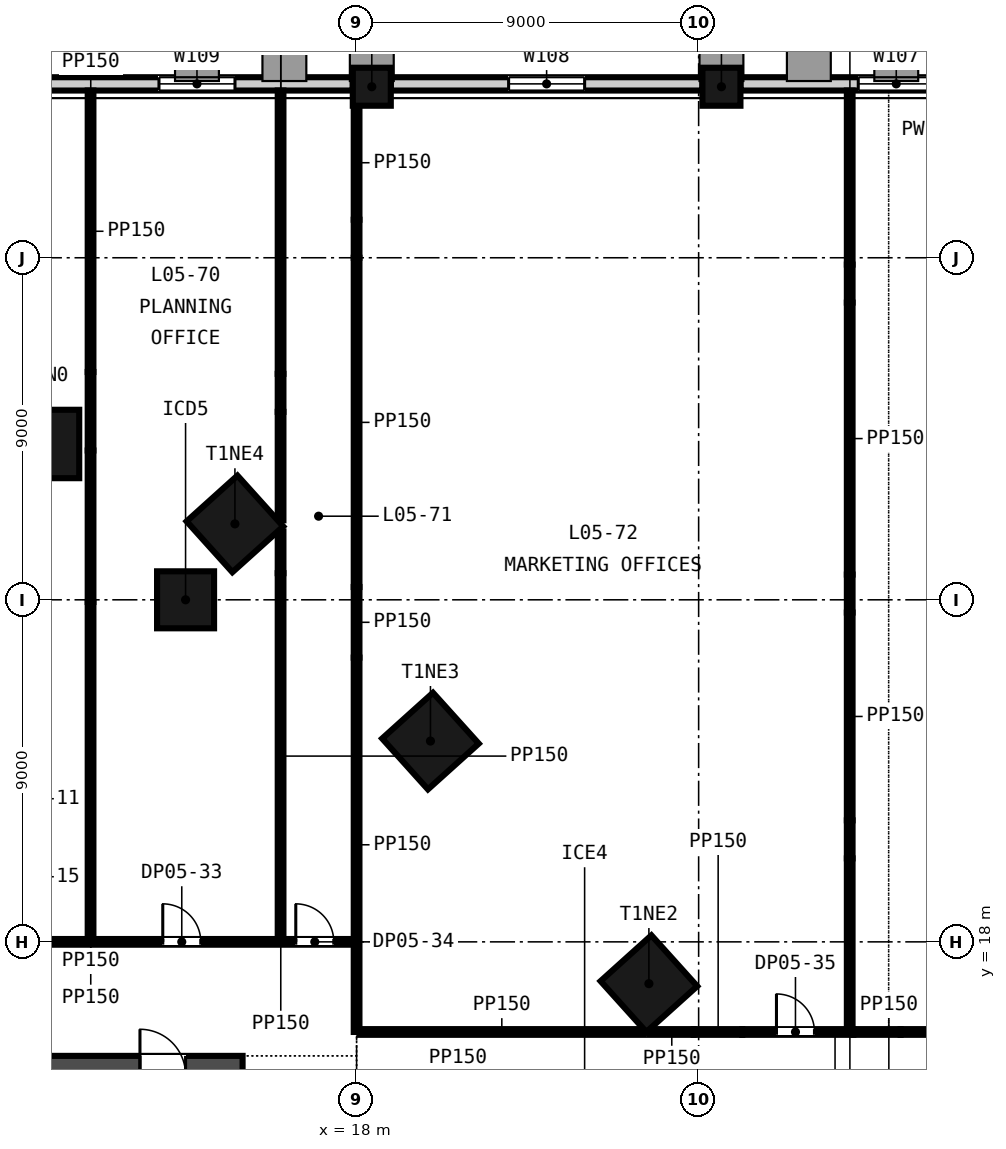
"""IFC4 building model, lengths in metres.
Left out: names, types, materials, properties, quantities, classifications, styles, units other than length and angle.
Written with IfcOpenShell. Run it as: python <this file> out.ifc"""

import sys

from ifc_helpers import new_model, si_unit, direction, frame, frame_2d, origin, origin_2d, place, context, subcontext, project, spatial, rectangle, extrude, element, fill, save


model = new_model("IFC4")
c1 = context("Model", 3, precision=1e-05, world=origin(), true_north=direction((0.0, 1.0)))
c2 = subcontext(c1, "Body", "Model", "MODEL_VIEW")
j1 = project(units=[si_unit("LENGTHUNIT", "METRE"), si_unit("PLANEANGLEUNIT", "RADIAN")], contexts=[c1])
p1 = place(None, origin())
s1 = spatial("IfcSite", under=j1, at=p1, CompositionType="ELEMENT")
p2 = place(p1, origin())
s2 = spatial("IfcBuilding", under=s1, at=p2, CompositionType="ELEMENT")
p3 = place(p2, frame((0.0, 0.0, 31.5)))
s3 = spatial("IfcBuildingStorey", under=s2, at=p3, CompositionType="ELEMENT", Elevation=31.5)
p4 = place(p3, frame((-15.0, 14.5, -0.3), z_axis=(0.0, 0.0, 1.0), x_axis=(1.0, 0.0, 0.0)))
e1 = element("IfcWall", 1, at=p4, inside=s3, PredefinedType="SOLIDWALL", context=c2, shape_type="SweptSolid", body=[
    extrude(rectangle(XDim=30.0, YDim=1.0, at=frame_2d((15.0, 0.0))), origin(), (0.0, 0.0, 1.0), 4.65),
])
p5 = place(p4, frame((9.25, 0.0, 0.3)))
e2 = element("IfcOpeningElement", 2, at=p5, cuts=e1, PredefinedType="OPENING", context=c2, shape_type="SweptSolid", body=[
    extrude(rectangle(XDim=1.5, YDim=2.1, at=frame_2d((0.75, 1.05))), frame((0.0, 0.51, 0.0), z_axis=(0.0, -1.0, 0.0), x_axis=(1.0, 0.0, 0.0)), (0.0, 0.0, 1.0), 1.02),
])
p6 = place(p4, frame((19.4, 0.0, 0.3)))
e3 = element("IfcOpeningElement", 3, at=p6, cuts=e1, PredefinedType="OPENING", context=c2, shape_type="SweptSolid", body=[
    extrude(rectangle(XDim=1.5, YDim=2.1, at=frame_2d((0.75, 1.05))), frame((0.0, 0.51, 0.0), z_axis=(0.0, -1.0, 0.0), x_axis=(1.0, 0.0, 0.0)), (0.0, 0.0, 1.0), 1.02),
])
p7 = place(p4, frame((1.5, 0.0, 0.3)))
e4 = element("IfcOpeningElement", 4, at=p7, cuts=e1, PredefinedType="OPENING", context=c2, shape_type="SweptSolid", body=[
    extrude(rectangle(XDim=1.2, YDim=2.1, at=frame_2d((0.6, 1.05))), frame((0.0, 0.51, 0.0), z_axis=(0.0, -1.0, 0.0), x_axis=(1.0, 0.0, 0.0)), (0.0, 0.0, 1.0), 1.02),
])
p8 = place(p4, frame((27.3, 0.0, 0.3)))
e5 = element("IfcOpeningElement", 5, at=p8, cuts=e1, PredefinedType="OPENING", context=c2, shape_type="SweptSolid", body=[
    extrude(rectangle(XDim=1.2, YDim=2.1, at=frame_2d((0.6, 1.05))), frame((0.0, 0.51, 0.0), z_axis=(0.0, -1.0, 0.0), x_axis=(1.0, 0.0, 0.0)), (0.0, 0.0, 1.0), 1.02),
])
for number, where, z_axis, x_axis in (
    (6, (9.802, 31.1, -0.3), (0.0, 0.0, 1.0), (-1.0, 0.0, 0.0)),
    (7, (25.691, 16.9, -0.3), (0.0, 0.0, 1.0), (-0.669, 0.743, 0.0)),
    (8, (19.944, 23.283, -0.3), (0.0, 0.0, 1.0), (-0.669, 0.743, 0.0)),
    (9, (14.799, 28.998, -0.3), (0.0, 0.0, 1.0), (-0.669, 0.743, 0.0)),
):
    element("IfcColumn", number, at=place(p3, frame(where, z_axis=z_axis, x_axis=x_axis)), inside=s3, PredefinedType="COLUMN", context=c2, shape_type="SweptSolid", body=[
        extrude(rectangle(XDim=1.8, YDim=1.8, at=origin_2d()), origin(), (0.0, 0.0, 1.0), 4.65),
    ])
p9 = place(p3, frame((13.5, 27.0, -0.3), z_axis=(0.0, 0.0, 1.0), x_axis=(1.0, 0.0, 0.0)))
e10 = element("IfcColumn", 10, at=p9, inside=s3, PredefinedType="COLUMN", context=c2, shape_type="SweptSolid", body=[
    extrude(rectangle(XDim=1.5, YDim=1.5, at=origin_2d()), origin(), (0.0, 0.0, 1.0), 4.65),
])
for number, where, z_axis, x_axis in (
    (11, (27.6, 40.5, -0.3), (0.0, 0.0, 1.0), (-1.0, 0.0, 0.0)),
    (12, (18.4, 40.5, -0.3), (0.0, 0.0, 1.0), (-1.0, 0.0, 0.0)),
):
    element("IfcColumn", number, at=place(p3, frame(where, z_axis=z_axis, x_axis=x_axis)), inside=s3, PredefinedType="COLUMN", context=c2, shape_type="SweptSolid", body=[
        extrude(rectangle(XDim=1.0, YDim=1.0, at=origin_2d()), origin(), (0.0, 0.0, 1.0), 4.65),
    ])
p10 = place(p3, frame((36.3, 40.575, -0.3), z_axis=(0.0, 0.0, 1.0), x_axis=(-1.0, 0.0, 0.0)))
e13 = element("IfcWall", 13, at=p10, inside=s3, PredefinedType="SOLIDWALL", context=c2, shape_type="SweptSolid", body=[
    extrude(rectangle(XDim=8.2, YDim=0.35, at=frame_2d((4.1, 0.0))), origin(), (0.0, 0.0, 1.0), 3.75),
])
p11 = place(p10, frame((3.1, 0.0, 1.2)))
e14 = element("IfcOpeningElement", 14, at=p11, cuts=e13, PredefinedType="OPENING", context=c2, shape_type="SweptSolid", body=[
    extrude(rectangle(XDim=2.0, YDim=2.5, at=frame_2d((1.0, 1.25))), frame((0.0, 0.185, 0.0), z_axis=(0.0, -1.0, 0.0), x_axis=(1.0, 0.0, 0.0)), (0.0, 0.0, 1.0), 0.37),
])
p12 = place(p3, frame((27.1, 40.575, -0.3), z_axis=(0.0, 0.0, 1.0), x_axis=(-1.0, 0.0, 0.0)))
e15 = element("IfcWall", 15, at=p12, inside=s3, PredefinedType="SOLIDWALL", context=c2, shape_type="SweptSolid", body=[
    extrude(rectangle(XDim=8.2, YDim=0.35, at=frame_2d((4.1, 0.0))), origin(), (0.0, 0.0, 1.0), 3.75),
])
p13 = place(p12, frame((3.1, 0.0, 1.2)))
e16 = element("IfcOpeningElement", 16, at=p13, cuts=e15, PredefinedType="OPENING", context=c2, shape_type="SweptSolid", body=[
    extrude(rectangle(XDim=2.0, YDim=2.5, at=frame_2d((1.0, 1.25))), frame((0.0, 0.185, 0.0), z_axis=(0.0, -1.0, 0.0), x_axis=(1.0, 0.0, 0.0)), (0.0, 0.0, 1.0), 0.37),
])
p14 = place(p3, frame((17.9, 40.575, -0.3), z_axis=(0.0, 0.0, 1.0), x_axis=(-1.0, 0.0, 0.0)))
e17 = element("IfcWall", 17, at=p14, inside=s3, PredefinedType="SOLIDWALL", context=c2, shape_type="SweptSolid", body=[
    extrude(rectangle(XDim=8.2, YDim=0.35, at=frame_2d((4.1, 0.0))), origin(), (0.0, 0.0, 1.0), 3.75),
])
p15 = place(p14, frame((3.1, 0.0, 1.2)))
e18 = element("IfcOpeningElement", 18, at=p15, cuts=e17, PredefinedType="OPENING", context=c2, shape_type="SweptSolid", body=[
    extrude(rectangle(XDim=2.0, YDim=2.5, at=frame_2d((1.0, 1.25))), frame((0.0, 0.185, 0.0), z_axis=(0.0, -1.0, 0.0), x_axis=(1.0, 0.0, 0.0)), (0.0, 0.0, 1.0), 0.37),
])
p16 = place(p3, frame((18.075, 15.629, 0.0), z_axis=(0.0, 0.0, 1.0), x_axis=(1.0, 0.0, 0.0)))
e19 = element("IfcWall", 19, at=p16, inside=s3, PredefinedType="PARTITIONING", context=c2, shape_type="SweptSolid", body=[
    extrude(rectangle(XDim=7.482, YDim=0.15, at=frame_2d((3.741, 0.0))), origin(), (0.0, 0.0, 1.0), 4.35),
])
p17 = place(p3, frame((25.708, 15.629, 0.0), z_axis=(0.0, 0.0, 1.0), x_axis=(1.0, 0.0, 0.0)))
e20 = element("IfcWall", 20, at=p17, inside=s3, PredefinedType="PARTITIONING", context=c2, shape_type="SweptSolid", body=[
    extrude(rectangle(XDim=1.162, YDim=0.15, at=frame_2d((0.581, 0.0))), origin(), (0.0, 0.0, 1.0), 4.35),
])
p18 = place(p3, frame((26.869, 15.629, 0.0), z_axis=(0.0, 0.0, 1.0), x_axis=(1.0, 0.0, 0.0)))
e21 = element("IfcWall", 21, at=p18, inside=s3, PredefinedType="PARTITIONING", context=c2, shape_type="SweptSolid", body=[
    extrude(rectangle(XDim=1.278, YDim=0.15, at=frame_2d((0.639, 0.0))), origin(), (0.0, 0.0, 1.0), 3.5),
])
p19 = place(p3, frame((28.148, 15.629, 0.0), z_axis=(0.0, 0.0, 1.0), x_axis=(1.0, 0.0, 0.0)))
e22 = element("IfcWall", 22, at=p19, inside=s3, PredefinedType="PARTITIONING", context=c2, shape_type="SweptSolid", body=[
    extrude(rectangle(XDim=2.923, YDim=0.15, at=frame_2d((1.461, 0.0))), origin(), (0.0, 0.0, 1.0), 4.35),
])
p20 = place(p19, frame((0.9, 0.0, 0.0)))
e23 = element("IfcOpeningElement", 23, at=p20, cuts=e22, PredefinedType="OPENING", context=c2, shape_type="SweptSolid", body=[
    extrude(rectangle(XDim=1.0, YDim=2.1, at=frame_2d((0.5, 1.05))), frame((0.0, 0.085, 0.0), z_axis=(0.0, -1.0, 0.0), x_axis=(1.0, 0.0, 0.0)), (0.0, 0.0, 1.0), 0.17),
])
p21 = place(p3, frame((31.071, 15.629, 0.0), z_axis=(0.0, 0.0, 1.0), x_axis=(1.0, 0.0, 0.0)))
e24 = element("IfcWall", 24, at=p21, inside=s3, PredefinedType="PARTITIONING", context=c2, shape_type="SweptSolid", body=[
    extrude(rectangle(XDim=1.243, YDim=0.15, at=frame_2d((0.622, 0.0))), origin(), (0.0, 0.0, 1.0), 3.261),
])
p22 = place(p3, frame((32.314, 15.629, 0.0), z_axis=(0.0, 0.0, 1.0), x_axis=(1.0, 0.0, 0.0)))
e25 = element("IfcWall", 25, at=p22, inside=s3, PredefinedType="PARTITIONING", context=c2, shape_type="SweptSolid", body=[
    extrude(rectangle(XDim=12.611, YDim=0.15, at=frame_2d((6.305, 0.0))), origin(), (0.0, 0.0, 1.0), 4.35),
])
p23 = place(p3, frame((-26.142, 18.0, 0.0), z_axis=(0.0, 0.0, 1.0), x_axis=(1.0, 0.0, 0.0)))
e26 = element("IfcWall", 26, at=p23, inside=s3, PredefinedType="PARTITIONING", context=c2, shape_type="SweptSolid", body=[
    extrude(rectangle(XDim=44.067, YDim=0.15, at=frame_2d((22.034, 0.0))), origin(), (0.0, 0.0, 1.0), 4.35),
])
p24 = place(p23, frame((13.542, 0.0, 0.0)))
e27 = element("IfcOpeningElement", 27, at=p24, cuts=e26, PredefinedType="OPENING", context=c2, shape_type="SweptSolid", body=[
    extrude(rectangle(XDim=1.0, YDim=2.1, at=frame_2d((0.5, 1.05))), frame((0.0, 0.085, 0.0), z_axis=(0.0, -1.0, 0.0), x_axis=(1.0, 0.0, 0.0)), (0.0, 0.0, 1.0), 0.17),
])
p25 = place(p23, frame((23.542, 0.0, 0.0)))
e28 = element("IfcOpeningElement", 28, at=p25, cuts=e26, PredefinedType="OPENING", context=c2, shape_type="SweptSolid", body=[
    extrude(rectangle(XDim=1.0, YDim=2.1, at=frame_2d((0.5, 1.05))), frame((0.0, 0.085, 0.0), z_axis=(0.0, -1.0, 0.0), x_axis=(1.0, 0.0, 0.0)), (0.0, 0.0, 1.0), 0.17),
])
p26 = place(p23, frame((32.042, 0.0, 0.0)))
e29 = element("IfcOpeningElement", 29, at=p26, cuts=e26, PredefinedType="OPENING", context=c2, shape_type="SweptSolid", body=[
    extrude(rectangle(XDim=1.0, YDim=2.1, at=frame_2d((0.5, 1.05))), frame((0.0, 0.085, 0.0), z_axis=(0.0, -1.0, 0.0), x_axis=(1.0, 0.0, 0.0)), (0.0, 0.0, 1.0), 0.17),
])
p27 = place(p23, frame((39.042, 0.0, 0.0)))
e30 = element("IfcOpeningElement", 30, at=p27, cuts=e26, PredefinedType="OPENING", context=c2, shape_type="SweptSolid", body=[
    extrude(rectangle(XDim=1.0, YDim=2.1, at=frame_2d((0.5, 1.05))), frame((0.0, 0.085, 0.0), z_axis=(0.0, -1.0, 0.0), x_axis=(1.0, 0.0, 0.0)), (0.0, 0.0, 1.0), 0.17),
])
p28 = place(p23, frame((42.542, 0.0, 0.0)))
e31 = element("IfcOpeningElement", 31, at=p28, cuts=e26, PredefinedType="OPENING", context=c2, shape_type="SweptSolid", body=[
    extrude(rectangle(XDim=1.0, YDim=2.1, at=frame_2d((0.5, 1.05))), frame((0.0, 0.085, 0.0), z_axis=(0.0, -1.0, 0.0), x_axis=(1.0, 0.0, 0.0)), (0.0, 0.0, 1.0), 0.17),
])
p29 = place(p3, frame((11.0, 18.075, 0.0), z_axis=(0.0, 0.0, 1.0), x_axis=(0.0, 1.0, 0.0)))
e32 = element("IfcWall", 32, at=p29, inside=s3, PredefinedType="PARTITIONING", context=c2, shape_type="SweptSolid", body=[
    extrude(rectangle(XDim=8.868, YDim=0.15, at=frame_2d((4.434, 0.0))), origin(), (0.0, 0.0, 1.0), 3.671),
])
p30 = place(p3, frame((11.0, 26.943, 0.0), z_axis=(0.0, 0.0, 1.0), x_axis=(0.0, 1.0, 0.0)))
e33 = element("IfcWall", 33, at=p30, inside=s3, PredefinedType="PARTITIONING", context=c2, shape_type="SweptSolid", body=[
    extrude(rectangle(XDim=3.985, YDim=0.15, at=frame_2d((1.993, 0.0))), origin(), (0.0, 0.0, 1.0), 4.35),
])
p31 = place(p3, frame((11.0, 30.928, 0.0), z_axis=(0.0, 0.0, 1.0), x_axis=(0.0, 1.0, 0.0)))
e34 = element("IfcWall", 34, at=p31, inside=s3, PredefinedType="PARTITIONING", context=c2, shape_type="SweptSolid", body=[
    extrude(rectangle(XDim=2.065, YDim=0.15, at=frame_2d((1.033, 0.0))), origin(), (0.0, 0.0, 1.0), 3.5),
])
p32 = place(p3, frame((11.0, 32.994, 0.0), z_axis=(0.0, 0.0, 1.0), x_axis=(0.0, 1.0, 0.0)))
e35 = element("IfcWall", 35, at=p32, inside=s3, PredefinedType="PARTITIONING", context=c2, shape_type="SweptSolid", body=[
    extrude(rectangle(XDim=7.406, YDim=0.15, at=frame_2d((3.703, 0.0))), origin(), (0.0, 0.0, 1.0), 4.35),
])
p33 = place(p3, frame((16.0, 18.075, 0.0), z_axis=(0.0, 0.0, 1.0), x_axis=(0.0, 1.0, 0.0)))
e36 = element("IfcWall", 36, at=p33, inside=s3, PredefinedType="PARTITIONING", context=c2, shape_type="SweptSolid", body=[
    extrude(rectangle(XDim=9.626, YDim=0.15, at=frame_2d((4.813, 0.0))), origin(), (0.0, 0.0, 1.0), 4.35),
])
p34 = place(p3, frame((16.0, 27.701, 0.0), z_axis=(0.0, 0.0, 1.0), x_axis=(0.0, 1.0, 0.0)))
e37 = element("IfcWall", 37, at=p34, inside=s3, PredefinedType="PARTITIONING", context=c2, shape_type="SweptSolid", body=[
    extrude(rectangle(XDim=1.1, YDim=0.15, at=frame_2d((0.55, 0.0))), origin(), (0.0, 0.0, 1.0), 3.5),
])
p35 = place(p3, frame((16.0, 29.092, 0.0), z_axis=(0.0, 0.0, 1.0), x_axis=(0.0, 1.0, 0.0)))
e38 = element("IfcWall", 38, at=p35, inside=s3, PredefinedType="PARTITIONING", context=c2, shape_type="SweptSolid", body=[
    extrude(rectangle(XDim=2.853, YDim=0.15, at=frame_2d((1.427, 0.0))), origin(), (0.0, 0.0, 1.0), 4.35),
])
p36 = place(p3, frame((16.0, 31.945, 0.0), z_axis=(0.0, 0.0, 1.0), x_axis=(0.0, 1.0, 0.0)))
e39 = element("IfcWall", 39, at=p36, inside=s3, PredefinedType="PARTITIONING", context=c2, shape_type="SweptSolid", body=[
    extrude(rectangle(XDim=1.0, YDim=0.15, at=frame_2d((0.5, 0.0))), origin(), (0.0, 0.0, 1.0), 3.671),
])
p37 = place(p3, frame((16.0, 32.945, 0.0), z_axis=(0.0, 0.0, 1.0), x_axis=(0.0, 1.0, 0.0)))
e40 = element("IfcWall", 40, at=p37, inside=s3, PredefinedType="PARTITIONING", context=c2, shape_type="SweptSolid", body=[
    extrude(rectangle(XDim=7.455, YDim=0.15, at=frame_2d((3.728, 0.0))), origin(), (0.0, 0.0, 1.0), 4.35),
])
p38 = place(p3, frame((18.0, 15.629, 0.0), z_axis=(0.0, 0.0, 1.0), x_axis=(0.0, 1.0, 0.0)))
e41 = element("IfcWall", 41, at=p38, inside=s3, PredefinedType="PARTITIONING", context=c2, shape_type="SweptSolid", body=[
    extrude(rectangle(XDim=9.85, YDim=0.15, at=frame_2d((4.925, 0.0))), origin(), (0.0, 0.0, 1.0), 4.35),
])
p39 = place(p3, frame((18.0, 25.479, 0.0), z_axis=(0.0, 0.0, 1.0), x_axis=(0.0, 1.0, 0.0)))
e42 = element("IfcWall", 42, at=p39, inside=s3, PredefinedType="PARTITIONING", context=c2, shape_type="SweptSolid", body=[
    extrude(rectangle(XDim=1.857, YDim=0.15, at=frame_2d((0.929, 0.0))), origin(), (0.0, 0.0, 1.0), 3.5),
])
p40 = place(p3, frame((18.0, 27.337, 0.0), z_axis=(0.0, 0.0, 1.0), x_axis=(0.0, 1.0, 0.0)))
e43 = element("IfcWall", 43, at=p40, inside=s3, PredefinedType="PARTITIONING", context=c2, shape_type="SweptSolid", body=[
    extrude(rectangle(XDim=8.664, YDim=0.15, at=frame_2d((4.332, 0.0))), origin(), (0.0, 0.0, 1.0), 4.35),
])
p41 = place(p3, frame((18.0, 36.0, 0.0), z_axis=(0.0, 0.0, 1.0), x_axis=(0.0, 1.0, 0.0)))
e44 = element("IfcWall", 44, at=p41, inside=s3, PredefinedType="PARTITIONING", context=c2, shape_type="SweptSolid", body=[
    extrude(rectangle(XDim=1.0, YDim=0.15, at=frame_2d((0.5, 0.0))), origin(), (0.0, 0.0, 1.0), 3.671),
])
p42 = place(p3, frame((18.0, 37.0, 0.0), z_axis=(0.0, 0.0, 1.0), x_axis=(0.0, 1.0, 0.0)))
e45 = element("IfcWall", 45, at=p42, inside=s3, PredefinedType="PARTITIONING", context=c2, shape_type="SweptSolid", body=[
    extrude(rectangle(XDim=3.0, YDim=0.15, at=frame_2d((1.5, 0.0))), origin(), (0.0, 0.0, 1.0), 4.35),
])
p43 = place(p3, frame((30.975, 15.704, 0.0), z_axis=(0.0, 0.0, 1.0), x_axis=(0.0, 1.0, 0.0)))
e46 = element("IfcWall", 46, at=p43, inside=s3, PredefinedType="PARTITIONING", context=c2, shape_type="SweptSolid", body=[
    extrude(rectangle(XDim=4.493, YDim=0.15, at=frame_2d((2.246, 0.0))), origin(), (0.0, 0.0, 1.0), 4.35),
])
p44 = place(p3, frame((30.975, 20.197, 0.0), z_axis=(0.0, 0.0, 1.0), x_axis=(0.0, 1.0, 0.0)))
e47 = element("IfcWall", 47, at=p44, inside=s3, PredefinedType="PARTITIONING", context=c2, shape_type="SweptSolid", body=[
    extrude(rectangle(XDim=1.0, YDim=0.15, at=frame_2d((0.5, 0.0))), origin(), (0.0, 0.0, 1.0), 3.261),
])
p45 = place(p3, frame((30.975, 21.197, 0.0), z_axis=(0.0, 0.0, 1.0), x_axis=(0.0, 1.0, 0.0)))
e48 = element("IfcWall", 48, at=p45, inside=s3, PredefinedType="PARTITIONING", context=c2, shape_type="SweptSolid", body=[
    extrude(rectangle(XDim=5.468, YDim=0.15, at=frame_2d((2.734, 0.0))), origin(), (0.0, 0.0, 1.0), 4.35),
])
p46 = place(p3, frame((30.975, 26.664, 0.0), z_axis=(0.0, 0.0, 1.0), x_axis=(0.0, 1.0, 0.0)))
e49 = element("IfcWall", 49, at=p46, inside=s3, PredefinedType="PARTITIONING", context=c2, shape_type="SweptSolid", body=[
    extrude(rectangle(XDim=1.0, YDim=0.15, at=frame_2d((0.5, 0.0))), origin(), (0.0, 0.0, 1.0), 3.261),
])
p47 = place(p3, frame((30.975, 27.664, 0.0), z_axis=(0.0, 0.0, 1.0), x_axis=(0.0, 1.0, 0.0)))
e50 = element("IfcWall", 50, at=p47, inside=s3, PredefinedType="PARTITIONING", context=c2, shape_type="SweptSolid", body=[
    extrude(rectangle(XDim=7.156, YDim=0.15, at=frame_2d((3.578, 0.0))), origin(), (0.0, 0.0, 1.0), 4.35),
])
p48 = place(p3, frame((30.975, 34.82, 0.0), z_axis=(0.0, 0.0, 1.0), x_axis=(0.0, 1.0, 0.0)))
e51 = element("IfcWall", 51, at=p48, inside=s3, PredefinedType="PARTITIONING", context=c2, shape_type="SweptSolid", body=[
    extrude(rectangle(XDim=1.0, YDim=0.15, at=frame_2d((0.5, 0.0))), origin(), (0.0, 0.0, 1.0), 3.369),
])
p49 = place(p3, frame((30.975, 35.82, 0.0), z_axis=(0.0, 0.0, 1.0), x_axis=(0.0, 1.0, 0.0)))
e52 = element("IfcWall", 52, at=p49, inside=s3, PredefinedType="PARTITIONING", context=c2, shape_type="SweptSolid", body=[
    extrude(rectangle(XDim=4.58, YDim=0.15, at=frame_2d((2.29, 0.0))), origin(), (0.0, 0.0, 1.0), 4.35),
])
p50 = place(p11, origin())
e53 = element("IfcWindow", 53, at=p50, inside=s3, PartitioningType="SINGLE_PANEL", PredefinedType="WINDOW", context=c2, shape_type="SweptSolid", body=[
    extrude(rectangle(XDim=2.0, YDim=2.5, at=frame_2d((1.0, 1.25))), frame((0.0, 0.03, 0.0), z_axis=(0.0, -1.0, 0.0), x_axis=(1.0, 0.0, 0.0)), (0.0, 0.0, 1.0), 0.06),
])
fill(e14, e53)
p51 = place(p13, origin())
e54 = element("IfcWindow", 54, at=p51, inside=s3, PartitioningType="SINGLE_PANEL", PredefinedType="WINDOW", context=c2, shape_type="SweptSolid", body=[
    extrude(rectangle(XDim=2.0, YDim=2.5, at=frame_2d((1.0, 1.25))), frame((0.0, 0.03, 0.0), z_axis=(0.0, -1.0, 0.0), x_axis=(1.0, 0.0, 0.0)), (0.0, 0.0, 1.0), 0.06),
])
fill(e16, e54)
p52 = place(p15, origin())
e55 = element("IfcWindow", 55, at=p52, inside=s3, PartitioningType="SINGLE_PANEL", PredefinedType="WINDOW", context=c2, shape_type="SweptSolid", body=[
    extrude(rectangle(XDim=2.0, YDim=2.5, at=frame_2d((1.0, 1.25))), frame((0.0, 0.03, 0.0), z_axis=(0.0, -1.0, 0.0), x_axis=(1.0, 0.0, 0.0)), (0.0, 0.0, 1.0), 0.06),
])
fill(e18, e55)
p53 = place(p27, origin())
e56 = element("IfcDoor", 56, at=p53, inside=s3, OperationType="SINGLE_SWING_LEFT", PredefinedType="DOOR", context=c2, shape_type="SweptSolid", body=[
    extrude(rectangle(XDim=1.0, YDim=2.1, at=frame_2d((0.5, 1.05))), frame((0.0, 0.025, 0.0), z_axis=(0.0, -1.0, 0.0), x_axis=(1.0, 0.0, 0.0)), (0.0, 0.0, 1.0), 0.05),
])
fill(e30, e56)
p54 = place(p28, origin())
e57 = element("IfcDoor", 57, at=p54, inside=s3, OperationType="SINGLE_SWING_LEFT", PredefinedType="DOOR", context=c2, shape_type="SweptSolid", body=[
    extrude(rectangle(XDim=1.0, YDim=2.1, at=frame_2d((0.5, 1.05))), frame((0.0, 0.025, 0.0), z_axis=(0.0, -1.0, 0.0), x_axis=(1.0, 0.0, 0.0)), (0.0, 0.0, 1.0), 0.05),
])
fill(e31, e57)
p55 = place(p20, origin())
e58 = element("IfcDoor", 58, at=p55, inside=s3, OperationType="SINGLE_SWING_LEFT", PredefinedType="DOOR", context=c2, shape_type="SweptSolid", body=[
    extrude(rectangle(XDim=1.0, YDim=2.1, at=frame_2d((0.5, 1.05))), frame((0.0, 0.025, 0.0), z_axis=(0.0, -1.0, 0.0), x_axis=(1.0, 0.0, 0.0)), (0.0, 0.0, 1.0), 0.05),
])
fill(e23, e58)
save(model, sys.argv[1])
